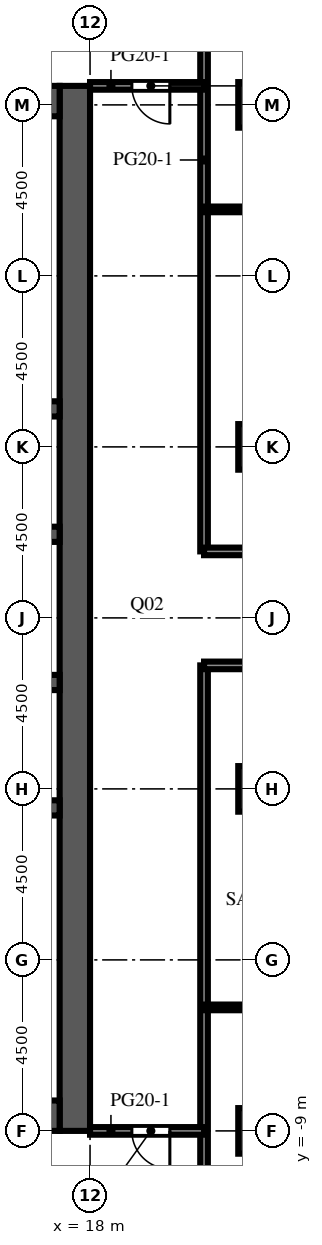
"""IFC4 building model, lengths in metres.
Left out: names, types, materials, properties, quantities, classifications, styles, units other than length and angle.
Written with IfcOpenShell. Run it as: python <this file> out.ifc"""

import sys

from ifc_helpers import new_model, si_unit, direction, frame, frame_2d, origin, origin_2d, place, context, subcontext, project, spatial, rectangle, extrude, element, fill, save


model = new_model("IFC4")
c1 = context("Model", 3, precision=1e-05, world=origin(), true_north=direction((0.0, 1.0)))
c2 = subcontext(c1, "Body", "Model", "MODEL_VIEW")
j1 = project(units=[si_unit("LENGTHUNIT", "METRE"), si_unit("PLANEANGLEUNIT", "RADIAN")], contexts=[c1])
p1 = place(None, origin())
s1 = spatial("IfcSite", under=j1, at=p1, CompositionType="ELEMENT")
p2 = place(p1, origin())
s2 = spatial("IfcBuilding", under=s1, at=p2, CompositionType="ELEMENT")
p3 = place(p2, frame((0.0, 0.0, 199.7)))
s3 = spatial("IfcBuildingStorey", under=s2, at=p3, CompositionType="ELEMENT", Elevation=199.7)
for number, where, z_axis, x_axis in (
    (1, (22.5, -9.0, 0.0), (0.0, 0.0, 1.0), (1.0, 0.0, 0.0)),
    (2, (22.5, 0.0, 0.0), (0.0, 0.0, 1.0), (1.0, 0.0, 0.0)),
    (3, (22.5, 9.0, 0.0), (0.0, 0.0, 1.0), (1.0, 0.0, 0.0)),
    (4, (22.5, 18.0, 0.0), (0.0, 0.0, 1.0), (1.0, 0.0, 0.0)),
):
    element("IfcColumn", number, at=place(p3, frame(where, z_axis=z_axis, x_axis=x_axis)), inside=s3, PredefinedType="COLUMN", context=c2, shape_type="SweptSolid", body=[
        extrude(rectangle(XDim=1.2, YDim=1.2, at=origin_2d()), origin(), (0.0, 0.0, 1.0), 4.1),
    ])
p4 = place(p3, frame((17.6, -9.0, 0.0), z_axis=(0.0, 0.0, 1.0), x_axis=(0.0, 1.0, 0.0)))
e5 = element("IfcWall", 5, at=p4, inside=s3, PredefinedType="SHEAR", context=c2, shape_type="SweptSolid", body=[
    extrude(rectangle(XDim=27.5, YDim=0.8, at=frame_2d((13.75, 0.0))), origin(), (0.0, 0.0, 1.0), 4.1),
])
p5 = place(p4, frame((12.55, 0.0, 0.0)))
e6 = element("IfcOpeningElement", 6, at=p5, cuts=e5, PredefinedType="OPENING", context=c2, shape_type="SweptSolid", body=[
    extrude(rectangle(XDim=2.4, YDim=2.4, at=frame_2d((1.2, 1.2))), frame((0.0, 0.41, 0.0), z_axis=(0.0, -1.0, 0.0), x_axis=(1.0, 0.0, 0.0)), (0.0, 0.0, 1.0), 0.82),
])
p6 = place(p4, frame((6.825, 0.0, 0.0)))
e7 = element("IfcOpeningElement", 7, at=p6, cuts=e5, PredefinedType="OPENING", context=c2, shape_type="SweptSolid", body=[
    extrude(rectangle(XDim=1.2, YDim=2.1, at=frame_2d((0.6, 1.05))), frame((0.0, 0.41, 0.0), z_axis=(0.0, -1.0, 0.0), x_axis=(1.0, 0.0, 0.0)), (0.0, 0.0, 1.0), 0.82),
])
p7 = place(p4, frame((19.475, 0.0, 0.0)))
e8 = element("IfcOpeningElement", 8, at=p7, cuts=e5, PredefinedType="OPENING", context=c2, shape_type="SweptSolid", body=[
    extrude(rectangle(XDim=1.2, YDim=2.1, at=frame_2d((0.6, 1.05))), frame((0.0, 0.41, 0.0), z_axis=(0.0, -1.0, 0.0), x_axis=(1.0, 0.0, 0.0)), (0.0, 0.0, 1.0), 0.82),
])
for number, where, z_axis, x_axis in (
    (9, (6.8, -8.6, 0.0), (0.0, 0.0, 1.0), (1.0, 0.0, 0.0)),
    (10, (6.8, 18.1, 0.0), (0.0, 0.0, 1.0), (1.0, 0.0, 0.0)),
):
    element("IfcWall", number, at=place(p3, frame(where, z_axis=z_axis, x_axis=x_axis)), inside=s3, PredefinedType="SHEAR", context=c2, shape_type="SweptSolid", body=[
        extrude(rectangle(XDim=10.4, YDim=0.8, at=frame_2d((5.2, 0.0))), origin(), (0.0, 0.0, 1.0), 4.1),
    ])
p8 = place(p3, frame((6.8, -0.5, 0.0), z_axis=(0.0, 0.0, 1.0), x_axis=(1.0, 0.0, 0.0)))
e11 = element("IfcWall", 11, at=p8, inside=s3, PredefinedType="SHEAR", context=c2, shape_type="SweptSolid", body=[
    extrude(rectangle(XDim=10.4, YDim=0.4, at=frame_2d((5.2, 0.0))), origin(), (0.0, 0.0, 1.0), 4.1),
])
p9 = place(p3, frame((6.8, 2.8, 0.0), z_axis=(0.0, 0.0, 1.0), x_axis=(1.0, 0.0, 0.0)))
e12 = element("IfcWall", 12, at=p9, inside=s3, PredefinedType="SHEAR", context=c2, shape_type="SweptSolid", body=[
    extrude(rectangle(XDim=10.4, YDim=0.4, at=frame_2d((5.2, 0.0))), origin(), (0.0, 0.0, 1.0), 4.1),
])
p10 = place(p9, frame((0.738, 0.0, 0.0)))
e13 = element("IfcOpeningElement", 13, at=p10, cuts=e12, PredefinedType="OPENING", context=c2, shape_type="SweptSolid", body=[
    extrude(rectangle(XDim=1.1, YDim=2.1, at=frame_2d((0.55, 1.05))), frame((0.0, 0.21, 0.0), z_axis=(0.0, -1.0, 0.0), x_axis=(1.0, 0.0, 0.0)), (0.0, 0.0, 1.0), 0.42),
])
p11 = place(p9, frame((3.337, 0.0, 0.0)))
e14 = element("IfcOpeningElement", 14, at=p11, cuts=e12, PredefinedType="OPENING", context=c2, shape_type="SweptSolid", body=[
    extrude(rectangle(XDim=1.1, YDim=2.1, at=frame_2d((0.55, 1.05))), frame((0.0, 0.21, 0.0), z_axis=(0.0, -1.0, 0.0), x_axis=(1.0, 0.0, 0.0)), (0.0, 0.0, 1.0), 0.42),
])
p12 = place(p9, frame((6.012, 0.0, 0.0)))
e15 = element("IfcOpeningElement", 15, at=p12, cuts=e12, PredefinedType="OPENING", context=c2, shape_type="SweptSolid", body=[
    extrude(rectangle(XDim=1.0, YDim=2.1, at=frame_2d((0.5, 1.05))), frame((0.0, 0.21, 0.0), z_axis=(0.0, -1.0, 0.0), x_axis=(1.0, 0.0, 0.0)), (0.0, 0.0, 1.0), 0.42),
])
p13 = place(p9, frame((8.613, 0.0, 0.0)))
e16 = element("IfcOpeningElement", 16, at=p13, cuts=e12, PredefinedType="OPENING", context=c2, shape_type="SweptSolid", body=[
    extrude(rectangle(XDim=1.0, YDim=2.1, at=frame_2d((0.5, 1.05))), frame((0.0, 0.21, 0.0), z_axis=(0.0, -1.0, 0.0), x_axis=(1.0, 0.0, 0.0)), (0.0, 0.0, 1.0), 0.42),
])
p14 = place(p3, frame((6.8, 6.7, 0.0), z_axis=(0.0, 0.0, 1.0), x_axis=(1.0, 0.0, 0.0)))
e17 = element("IfcWall", 17, at=p14, inside=s3, PredefinedType="SHEAR", context=c2, shape_type="SweptSolid", body=[
    extrude(rectangle(XDim=10.4, YDim=0.4, at=frame_2d((5.2, 0.0))), origin(), (0.0, 0.0, 1.0), 4.1),
])
p15 = place(p14, frame((3.337, 0.0, 0.0)))
e18 = element("IfcOpeningElement", 18, at=p15, cuts=e17, PredefinedType="OPENING", context=c2, shape_type="SweptSolid", body=[
    extrude(rectangle(XDim=1.1, YDim=2.1, at=frame_2d((0.55, 1.05))), frame((0.0, 0.21, 0.0), z_axis=(0.0, -1.0, 0.0), x_axis=(1.0, 0.0, 0.0)), (0.0, 0.0, 1.0), 0.42),
])
p16 = place(p14, frame((5.962, 0.0, 0.0)))
e19 = element("IfcOpeningElement", 19, at=p16, cuts=e17, PredefinedType="OPENING", context=c2, shape_type="SweptSolid", body=[
    extrude(rectangle(XDim=1.1, YDim=2.1, at=frame_2d((0.55, 1.05))), frame((0.0, 0.21, 0.0), z_axis=(0.0, -1.0, 0.0), x_axis=(1.0, 0.0, 0.0)), (0.0, 0.0, 1.0), 0.42),
])
p17 = place(p14, frame((8.663, 0.0, 0.0)))
e20 = element("IfcOpeningElement", 20, at=p17, cuts=e17, PredefinedType="OPENING", context=c2, shape_type="SweptSolid", body=[
    extrude(rectangle(XDim=1.1, YDim=2.1, at=frame_2d((0.55, 1.05))), frame((0.0, 0.21, 0.0), z_axis=(0.0, -1.0, 0.0), x_axis=(1.0, 0.0, 0.0)), (0.0, 0.0, 1.0), 0.42),
])
p18 = place(p14, frame((0.688, 0.0, 0.0)))
e21 = element("IfcOpeningElement", 21, at=p18, cuts=e17, PredefinedType="OPENING", context=c2, shape_type="SweptSolid", body=[
    extrude(rectangle(XDim=1.0, YDim=2.1, at=frame_2d((0.5, 1.05))), frame((0.0, 0.21, 0.0), z_axis=(0.0, -1.0, 0.0), x_axis=(1.0, 0.0, 0.0)), (0.0, 0.0, 1.0), 0.42),
])
p19 = place(p3, frame((6.8, 10.0, 0.0), z_axis=(0.0, 0.0, 1.0), x_axis=(1.0, 0.0, 0.0)))
e22 = element("IfcWall", 22, at=p19, inside=s3, PredefinedType="SHEAR", context=c2, shape_type="SweptSolid", body=[
    extrude(rectangle(XDim=10.4, YDim=0.4, at=frame_2d((5.2, 0.0))), origin(), (0.0, 0.0, 1.0), 4.1),
])
p20 = place(p3, frame((21.0, -26.85, 0.0), z_axis=(0.0, 0.0, 1.0), x_axis=(0.0, 1.0, 0.0)))
e23 = element("IfcWall", 23, at=p20, inside=s3, PredefinedType="PARTITIONING", context=c2, shape_type="SweptSolid", body=[
    extrude(rectangle(XDim=30.1, YDim=0.2, at=frame_2d((15.05, 0.0))), origin(), (0.0, 0.0, 1.0), 3.65),
])
p21 = place(p3, frame((21.0, 6.25, 0.0), z_axis=(0.0, 0.0, 1.0), x_axis=(0.0, 1.0, 0.0)))
e24 = element("IfcWall", 24, at=p21, inside=s3, PredefinedType="PARTITIONING", context=c2, shape_type="SweptSolid", body=[
    extrude(rectangle(XDim=20.6, YDim=0.2, at=frame_2d((10.3, 0.0))), origin(), (0.0, 0.0, 1.0), 3.65),
])
p22 = place(p3, frame((21.0, -9.0, 0.0), z_axis=(0.0, 0.0, 1.0), x_axis=(-1.0, 0.0, 0.0)))
e25 = element("IfcWall", 25, at=p22, inside=s3, PredefinedType="PARTITIONING", context=c2, shape_type="SweptSolid", body=[
    extrude(rectangle(XDim=3.0, YDim=0.2, at=frame_2d((1.5, 0.0))), origin(), (0.0, 0.0, 1.0), 3.65),
])
p23 = place(p22, frame((0.9, 0.0, 0.0)))
e26 = element("IfcOpeningElement", 26, at=p23, cuts=e25, PredefinedType="OPENING", context=c2, shape_type="SweptSolid", body=[
    extrude(rectangle(XDim=1.0, YDim=2.1, at=frame_2d((0.5, 1.05))), frame((0.0, 0.11, 0.0), z_axis=(0.0, -1.0, 0.0), x_axis=(1.0, 0.0, 0.0)), (0.0, 0.0, 1.0), 0.22),
])
p24 = place(p3, frame((31.35, -5.75, 0.0), z_axis=(0.0, 0.0, 1.0), x_axis=(-1.0, 0.0, 0.0)))
e27 = element("IfcWall", 27, at=p24, inside=s3, PredefinedType="PARTITIONING", context=c2, shape_type="SweptSolid", body=[
    extrude(rectangle(XDim=10.35, YDim=0.15, at=frame_2d((5.175, 0.0))), origin(), (0.0, 0.0, 1.0), 3.65),
])
p25 = place(p24, frame((4.75, 0.0, 0.0)))
e28 = element("IfcOpeningElement", 28, at=p25, cuts=e27, PredefinedType="OPENING", context=c2, shape_type="SweptSolid", body=[
    extrude(rectangle(XDim=1.0, YDim=2.1, at=frame_2d((0.5, 1.05))), frame((0.0, 0.085, 0.0), z_axis=(0.0, -1.0, 0.0), x_axis=(1.0, 0.0, 0.0)), (0.0, 0.0, 1.0), 0.17),
])
p26 = place(p3, frame((31.35, 3.25, 0.0), z_axis=(0.0, 0.0, 1.0), x_axis=(-1.0, 0.0, 0.0)))
e29 = element("IfcWall", 29, at=p26, inside=s3, PredefinedType="PARTITIONING", context=c2, shape_type="SweptSolid", body=[
    extrude(rectangle(XDim=10.35, YDim=0.2, at=frame_2d((5.175, 0.0))), origin(), (0.0, 0.0, 1.0), 3.65),
])
p27 = place(p26, frame((4.25, 0.0, 0.0)))
e30 = element("IfcOpeningElement", 30, at=p27, cuts=e29, PredefinedType="OPENING", context=c2, shape_type="SweptSolid", body=[
    extrude(rectangle(XDim=1.0, YDim=2.1, at=frame_2d((0.5, 1.05))), frame((0.0, 0.11, 0.0), z_axis=(0.0, -1.0, 0.0), x_axis=(1.0, 0.0, 0.0)), (0.0, 0.0, 1.0), 0.22),
])
p28 = place(p3, frame((21.0, 6.25, 0.0), z_axis=(0.0, 0.0, 1.0), x_axis=(1.0, 0.0, 0.0)))
e31 = element("IfcWall", 31, at=p28, inside=s3, PredefinedType="PARTITIONING", context=c2, shape_type="SweptSolid", body=[
    extrude(rectangle(XDim=10.35, YDim=0.2, at=frame_2d((5.175, 0.0))), origin(), (0.0, 0.0, 1.0), 3.65),
])
p29 = place(p28, frame((4.85, 0.0, 0.0)))
e32 = element("IfcOpeningElement", 32, at=p29, cuts=e31, PredefinedType="OPENING", context=c2, shape_type="SweptSolid", body=[
    extrude(rectangle(XDim=1.0, YDim=2.1, at=frame_2d((0.5, 1.05))), frame((0.0, 0.11, 0.0), z_axis=(0.0, -1.0, 0.0), x_axis=(1.0, 0.0, 0.0)), (0.0, 0.0, 1.0), 0.22),
])
p30 = place(p3, frame((21.0, 15.25, 0.0), z_axis=(0.0, 0.0, 1.0), x_axis=(1.0, 0.0, 0.0)))
e33 = element("IfcWall", 33, at=p30, inside=s3, PredefinedType="PARTITIONING", context=c2, shape_type="SweptSolid", body=[
    extrude(rectangle(XDim=10.35, YDim=0.15, at=frame_2d((5.175, 0.0))), origin(), (0.0, 0.0, 1.0), 3.65),
])
p31 = place(p30, frame((3.85, 0.0, 0.0)))
e34 = element("IfcOpeningElement", 34, at=p31, cuts=e33, PredefinedType="OPENING", context=c2, shape_type="SweptSolid", body=[
    extrude(rectangle(XDim=1.0, YDim=2.1, at=frame_2d((0.5, 1.05))), frame((0.0, 0.085, 0.0), z_axis=(0.0, -1.0, 0.0), x_axis=(1.0, 0.0, 0.0)), (0.0, 0.0, 1.0), 0.17),
])
p32 = place(p3, frame((18.0, 18.5, 0.0), z_axis=(0.0, 0.0, 1.0), x_axis=(1.0, 0.0, 0.0)))
e35 = element("IfcWall", 35, at=p32, inside=s3, PredefinedType="PARTITIONING", context=c2, shape_type="SweptSolid", body=[
    extrude(rectangle(XDim=3.0, YDim=0.2, at=frame_2d((1.5, 0.0))), origin(), (0.0, 0.0, 1.0), 3.65),
])
p33 = place(p32, frame((1.1, 0.0, 0.0)))
e36 = element("IfcOpeningElement", 36, at=p33, cuts=e35, PredefinedType="OPENING", context=c2, shape_type="SweptSolid", body=[
    extrude(rectangle(XDim=1.0, YDim=2.1, at=frame_2d((0.5, 1.05))), frame((0.0, 0.11, 0.0), z_axis=(0.0, -1.0, 0.0), x_axis=(1.0, 0.0, 0.0)), (0.0, 0.0, 1.0), 0.22),
])
p34 = place(p5, origin())
e37 = element("IfcDoor", 37, at=p34, inside=s3, OperationType="DOUBLE_DOOR_DOUBLE_SWING", PredefinedType="DOOR", context=c2, shape_type="SweptSolid", body=[
    extrude(rectangle(XDim=2.4, YDim=2.4, at=frame_2d((1.2, 1.2))), frame((0.0, 0.025, 0.0), z_axis=(0.0, -1.0, 0.0), x_axis=(1.0, 0.0, 0.0)), (0.0, 0.0, 1.0), 0.05),
])
fill(e6, e37)
p35 = place(p6, frame((1.2, 0.0, 0.0), z_axis=(0.0, 0.0, 1.0), x_axis=(-1.0, 0.0, 0.0)))
e38 = element("IfcDoor", 38, at=p35, inside=s3, OperationType="SINGLE_SWING_LEFT", PredefinedType="DOOR", context=c2, shape_type="SweptSolid", body=[
    extrude(rectangle(XDim=1.2, YDim=2.1, at=frame_2d((0.6, 1.05))), frame((0.0, 0.025, 0.0), z_axis=(0.0, -1.0, 0.0), x_axis=(1.0, 0.0, 0.0)), (0.0, 0.0, 1.0), 0.05),
])
fill(e7, e38)
p36 = place(p7, frame((1.2, 0.0, 0.0), z_axis=(0.0, 0.0, 1.0), x_axis=(-1.0, 0.0, 0.0)))
e39 = element("IfcDoor", 39, at=p36, inside=s3, OperationType="SINGLE_SWING_LEFT", PredefinedType="DOOR", context=c2, shape_type="SweptSolid", body=[
    extrude(rectangle(XDim=1.2, YDim=2.1, at=frame_2d((0.6, 1.05))), frame((0.0, 0.025, 0.0), z_axis=(0.0, -1.0, 0.0), x_axis=(1.0, 0.0, 0.0)), (0.0, 0.0, 1.0), 0.05),
])
fill(e8, e39)
p37 = place(p23, origin())
e40 = element("IfcDoor", 40, at=p37, inside=s3, OperationType="SINGLE_SWING_LEFT", PredefinedType="DOOR", context=c2, shape_type="SweptSolid", body=[
    extrude(rectangle(XDim=1.0, YDim=2.1, at=frame_2d((0.5, 1.05))), frame((0.0, 0.025, 0.0), z_axis=(0.0, -1.0, 0.0), x_axis=(1.0, 0.0, 0.0)), (0.0, 0.0, 1.0), 0.05),
])
fill(e26, e40)
p38 = place(p33, origin())
e41 = element("IfcDoor", 41, at=p38, inside=s3, OperationType="SINGLE_SWING_RIGHT", PredefinedType="DOOR", context=c2, shape_type="SweptSolid", body=[
    extrude(rectangle(XDim=1.0, YDim=2.1, at=frame_2d((0.5, 1.05))), frame((0.0, 0.025, 0.0), z_axis=(0.0, -1.0, 0.0), x_axis=(1.0, 0.0, 0.0)), (0.0, 0.0, 1.0), 0.05),
])
fill(e36, e41)
save(model, sys.argv[1])
